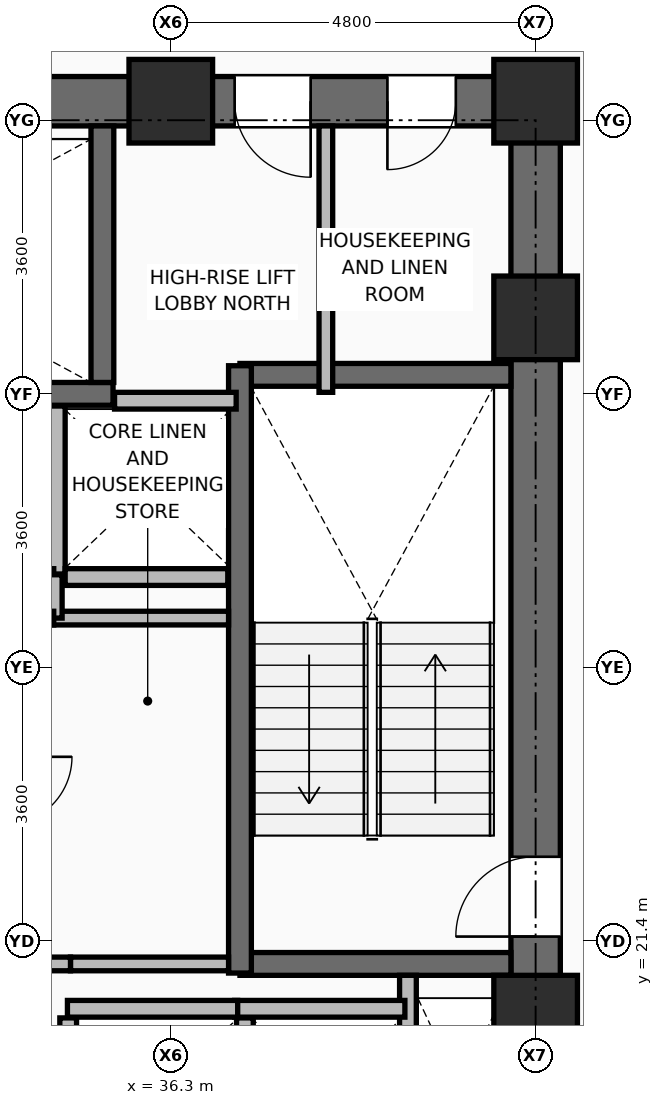
"""IFC4 building model, lengths in metres.
Left out: names, types, materials, properties, quantities, classifications, styles, units other than length and angle.
Written with IfcOpenShell. Run it as: python <this file> out.ifc"""

import sys

from ifc_helpers import new_model, si_unit, direction, frame, frame_2d, origin, origin_2d, place, context, subcontext, project, spatial, rectangle, extrude, element, fill, save


model = new_model("IFC4")
c1 = context("Model", 3, precision=1e-05, world=origin(), true_north=direction((0.0, 1.0)))
c2 = subcontext(c1, "Body", "Model", "MODEL_VIEW")
j1 = project(units=[si_unit("LENGTHUNIT", "METRE"), si_unit("PLANEANGLEUNIT", "RADIAN")], contexts=[c1])
p1 = place(None, origin())
s1 = spatial("IfcSite", under=j1, at=p1, CompositionType="ELEMENT")
p2 = place(p1, origin())
s2 = spatial("IfcBuilding", under=s1, at=p2, CompositionType="ELEMENT")
p3 = place(p2, frame((0.0, 0.0, 60.75)))
s3 = spatial("IfcBuildingStorey", under=s2, at=p3, CompositionType="ELEMENT", Elevation=60.75)
for number, where, z_axis, x_axis in (
    (1, (41.1, 20.4, 0.0), (0.0, 0.0, 1.0), (1.0, 0.0, 0.0)),
    (2, (41.1, 29.6, 0.0), (0.0, 0.0, 1.0), (1.0, 0.0, 0.0)),
    (3, (36.3, 32.45, 0.0), (0.0, 0.0, 1.0), (1.0, 0.0, 0.0)),
    (4, (41.1, 32.45, 0.0), (0.0, 0.0, 1.0), (1.0, 0.0, 0.0)),
):
    element("IfcColumn", number, at=place(p3, frame(where, z_axis=z_axis, x_axis=x_axis)), inside=s3, PredefinedType="COLUMN", context=c2, shape_type="SweptSolid", body=[
        extrude(rectangle(XDim=1.1, YDim=1.1, at=origin_2d()), origin(), (0.0, 0.0, 1.0), 3.75),
    ])
p4 = place(p3, frame((34.95, 17.92, 0.0), z_axis=(0.0, 0.0, 1.0), x_axis=(0.0, 1.0, 0.0)))
e5 = element("IfcWall", 5, at=p4, inside=s3, PredefinedType="PARTITIONING", context=c2, shape_type="SweptSolid", body=[
    extrude(rectangle(XDim=2.47, YDim=0.22, at=frame_2d((1.235, 0.0))), origin(), (0.0, 0.0, 1.0), 2.928),
])
p5 = place(p3, frame((37.275, 18.08, 0.0), z_axis=(0.0, 0.0, 1.0), x_axis=(0.0, 1.0, 0.0)))
e6 = element("IfcWall", 6, at=p5, inside=s3, PredefinedType="PARTITIONING", context=c2, shape_type="SweptSolid", body=[
    extrude(rectangle(XDim=2.31, YDim=0.22, at=frame_2d((1.155, 0.0))), origin(), (0.0, 0.0, 1.0), 3.545),
])
p6 = place(p3, frame((34.8, 26.23, 0.0), z_axis=(0.0, 0.0, 1.0), x_axis=(0.0, 1.0, 0.0)))
e7 = element("IfcWall", 7, at=p6, inside=s3, PredefinedType="PARTITIONING", context=c2, shape_type="SweptSolid", body=[
    extrude(rectangle(XDim=2.21, YDim=0.22, at=frame_2d((1.105, 0.0))), origin(), (0.0, 0.0, 1.0), 3.545),
])
p7 = place(p3, frame((34.91, 26.19, 0.0), z_axis=(0.0, 0.0, 1.0), x_axis=(1.0, 0.0, 0.0)))
e8 = element("IfcWall", 8, at=p7, inside=s3, PredefinedType="PARTITIONING", context=c2, shape_type="SweptSolid", body=[
    extrude(rectangle(XDim=2.14, YDim=0.22, at=frame_2d((1.07, 0.0))), origin(), (0.0, 0.0, 1.0), 3.545),
])
p8 = place(p3, frame((21.575, 32.45, 0.0), z_axis=(0.0, 0.0, 1.0), x_axis=(1.0, 0.0, 0.0)))
e9 = element("IfcWall", 9, at=p8, inside=s3, PredefinedType="SHEAR", context=c2, shape_type="SweptSolid", body=[
    extrude(rectangle(XDim=19.85, YDim=0.65, at=frame_2d((9.925, 0.0))), origin(), (0.0, 0.0, 1.0), 3.57),
])
p9 = place(p8, frame((2.175, 0.0, 0.0)))
e10 = element("IfcOpeningElement", 10, at=p9, cuts=e9, PredefinedType="OPENING", context=c2, shape_type="SweptSolid", body=[
    extrude(rectangle(XDim=1.1, YDim=2.1, at=frame_2d((0.55, 1.05))), frame((0.0, 0.335, 0.0), z_axis=(0.0, -1.0, 0.0), x_axis=(1.0, 0.0, 0.0)), (0.0, 0.0, 1.0), 0.67),
])
p10 = place(p8, frame((15.565, 0.0, 0.0)))
e11 = element("IfcOpeningElement", 11, at=p10, cuts=e9, PredefinedType="OPENING", context=c2, shape_type="SweptSolid", body=[
    extrude(rectangle(XDim=1.0, YDim=2.1, at=frame_2d((0.5, 1.05))), frame((0.0, 0.335, 0.0), z_axis=(0.0, -1.0, 0.0), x_axis=(1.0, 0.0, 0.0)), (0.0, 0.0, 1.0), 0.67),
])
p11 = place(p8, frame((17.575, 0.0, 0.0)))
e12 = element("IfcOpeningElement", 12, at=p11, cuts=e9, PredefinedType="OPENING", context=c2, shape_type="SweptSolid", body=[
    extrude(rectangle(XDim=0.9, YDim=2.1, at=frame_2d((0.45, 1.05))), frame((0.0, 0.335, 0.0), z_axis=(0.0, -1.0, 0.0), x_axis=(1.0, 0.0, 0.0)), (0.0, 0.0, 1.0), 0.67),
])
p12 = place(p3, frame((41.1, 18.125, 0.0), z_axis=(0.0, 0.0, 1.0), x_axis=(0.0, 1.0, 0.0)))
e13 = element("IfcWall", 13, at=p12, inside=s3, PredefinedType="SHEAR", context=c2, shape_type="SweptSolid", body=[
    extrude(rectangle(XDim=14.0, YDim=0.65, at=frame_2d((7.0, 0.0))), origin(), (0.0, 0.0, 1.0), 3.57),
])
p13 = place(p12, frame((3.335, 0.0, 0.0)))
e14 = element("IfcOpeningElement", 14, at=p13, cuts=e13, PredefinedType="OPENING", context=c2, shape_type="SweptSolid", body=[
    extrude(rectangle(XDim=1.05, YDim=2.1, at=frame_2d((0.525, 1.05))), frame((0.0, 0.335, 0.0), z_axis=(0.0, -1.0, 0.0), x_axis=(1.0, 0.0, 0.0)), (0.0, 0.0, 1.0), 0.67),
])
for number, where, z_axis, x_axis in (
    (15, (37.21, 21.1, 0.0), (0.0, 0.0, 1.0), (1.0, 0.0, 0.0)),
    (16, (37.21, 28.85, 0.0), (0.0, 0.0, 1.0), (1.0, 0.0, 0.0)),
):
    element("IfcWall", number, at=place(p3, frame(where, z_axis=z_axis, x_axis=x_axis)), inside=s3, PredefinedType="SHEAR", context=c2, shape_type="SweptSolid", body=[
        extrude(rectangle(XDim=3.565, YDim=0.3, at=frame_2d((1.782, 0.0))), origin(), (0.0, 0.0, 1.0), 3.57),
    ])
p14 = place(p3, frame((37.21, 20.98, 0.0), z_axis=(0.0, 0.0, 1.0), x_axis=(0.0, 1.0, 0.0)))
e17 = element("IfcWall", 17, at=p14, inside=s3, PredefinedType="SHEAR", context=c2, shape_type="SweptSolid", body=[
    extrude(rectangle(XDim=7.99, YDim=0.3, at=frame_2d((3.995, 0.0))), origin(), (0.0, 0.0, 1.0), 3.57),
])
p15 = place(p3, frame((27.51, 28.6, 0.0), z_axis=(0.0, 0.0, 1.0), x_axis=(1.0, 0.0, 0.0)))
e18 = element("IfcWall", 18, at=p15, inside=s3, PredefinedType="SHEAR", context=c2, shape_type="SweptSolid", body=[
    extrude(rectangle(XDim=8.03, YDim=0.3, at=frame_2d((4.015, 0.0))), origin(), (0.0, 0.0, 1.0), 3.57),
])
p16 = place(p3, frame((35.4, 28.75, 0.0), z_axis=(0.0, 0.0, 1.0), x_axis=(0.0, 1.0, 0.0)))
e19 = element("IfcWall", 19, at=p16, inside=s3, PredefinedType="SHEAR", context=c2, shape_type="SweptSolid", body=[
    extrude(rectangle(XDim=3.375, YDim=0.3, at=frame_2d((1.688, 0.0))), origin(), (0.0, 0.0, 1.0), 3.57),
])
p17 = place(p3, frame((39.42, 18.125, 0.0), z_axis=(0.0, 0.0, 1.0), x_axis=(0.0, 1.0, 0.0)))
e20 = element("IfcWall", 20, at=p17, inside=s3, PredefinedType="PARTITIONING", context=c2, shape_type="SweptSolid", body=[
    extrude(rectangle(XDim=2.825, YDim=0.22, at=frame_2d((1.413, 0.0))), origin(), (0.0, 0.0, 1.0), 3.55),
])
for number, where, z_axis, x_axis in (
    (21, (37.14, 20.51, 0.0), (0.0, 0.0, 1.0), (1.0, 0.0, 0.0)),
    (22, (34.94, 20.51, 0.0), (0.0, 0.0, 1.0), (1.0, 0.0, 0.0)),
):
    element("IfcWall", number, at=place(p3, frame(where, z_axis=z_axis, x_axis=x_axis)), inside=s3, PredefinedType="PARTITIONING", context=c2, shape_type="SweptSolid", body=[
        extrude(rectangle(XDim=2.24, YDim=0.22, at=frame_2d((1.12, 0.0))), origin(), (0.0, 0.0, 1.0), 3.55),
    ])
p18 = place(p3, frame((32.44, 26.19, 0.0), z_axis=(0.0, 0.0, 1.0), x_axis=(1.0, 0.0, 0.0)))
e23 = element("IfcWall", 23, at=p18, inside=s3, PredefinedType="PARTITIONING", context=c2, shape_type="SweptSolid", body=[
    extrude(rectangle(XDim=2.32, YDim=0.22, at=frame_2d((1.16, 0.0))), origin(), (0.0, 0.0, 1.0), 3.55),
])
p19 = place(p3, frame((35.56, 28.51, 0.0), z_axis=(0.0, 0.0, 1.0), x_axis=(1.0, 0.0, 0.0)))
e24 = element("IfcWall", 24, at=p19, inside=s3, PredefinedType="PARTITIONING", context=c2, shape_type="SweptSolid", body=[
    extrude(rectangle(XDim=1.6, YDim=0.22, at=frame_2d((0.8, 0.0))), origin(), (0.0, 0.0, 1.0), 3.55),
])
p20 = place(p3, frame((34.98, 21.1, 0.0), z_axis=(0.0, 0.0, 1.0), x_axis=(1.0, 0.0, 0.0)))
e25 = element("IfcWall", 25, at=p20, inside=s3, PredefinedType="PARTITIONING", context=c2, shape_type="SweptSolid", body=[
    extrude(rectangle(XDim=2.08, YDim=0.18, at=frame_2d((1.04, 0.0))), origin(), (0.0, 0.0, 1.0), 3.55),
])
p21 = place(p3, frame((34.72, 25.65, 0.0), z_axis=(0.0, 0.0, 1.0), x_axis=(1.0, 0.0, 0.0)))
e26 = element("IfcWall", 26, at=p21, inside=s3, PredefinedType="PARTITIONING", context=c2, shape_type="SweptSolid", body=[
    extrude(rectangle(XDim=2.34, YDim=0.18, at=frame_2d((1.17, 0.0))), origin(), (0.0, 0.0, 1.0), 3.55),
])
p22 = place(p3, frame((34.76, 25.65, 0.0), z_axis=(0.0, 0.0, 1.0), x_axis=(0.0, 1.0, 0.0)))
e27 = element("IfcWall", 27, at=p22, inside=s3, PredefinedType="PARTITIONING", context=c2, shape_type="SweptSolid", body=[
    extrude(rectangle(XDim=0.57, YDim=0.22, at=frame_2d((0.285, 0.0))), origin(), (0.0, 0.0, 1.0), 3.55),
])
p23 = place(p3, frame((34.1, 21.1, 0.0), z_axis=(0.0, 0.0, 1.0), x_axis=(1.0, 0.0, 0.0)))
e28 = element("IfcWall", 28, at=p23, inside=s3, PredefinedType="PARTITIONING", context=c2, shape_type="SweptSolid", body=[
    extrude(rectangle(XDim=0.88, YDim=0.18, at=frame_2d((0.44, 0.0))), origin(), (0.0, 0.0, 1.0), 3.55),
])
p24 = place(p3, frame((34.1, 25.65, 0.0), z_axis=(0.0, 0.0, 1.0), x_axis=(1.0, 0.0, 0.0)))
e29 = element("IfcWall", 29, at=p24, inside=s3, PredefinedType="PARTITIONING", context=c2, shape_type="SweptSolid", body=[
    extrude(rectangle(XDim=0.66, YDim=0.18, at=frame_2d((0.33, 0.0))), origin(), (0.0, 0.0, 1.0), 3.55),
])
p25 = place(p3, frame((38.34, 28.62, 0.0), z_axis=(0.0, 0.0, 1.0), x_axis=(0.0, 1.0, 0.0)))
e30 = element("IfcWall", 30, at=p25, inside=s3, PredefinedType="PARTITIONING", context=c2, shape_type="SweptSolid", body=[
    extrude(rectangle(XDim=3.505, YDim=0.18, at=frame_2d((1.752, 0.0))), origin(), (0.0, 0.0, 1.0), 3.55),
])
p26 = place(p13, origin())
e31 = element("IfcDoor", 31, at=p26, inside=s3, OperationType="SINGLE_SWING_LEFT", PredefinedType="DOOR", context=c2, shape_type="SweptSolid", body=[
    extrude(rectangle(XDim=1.05, YDim=2.1, at=frame_2d((0.525, 1.05))), frame((0.0, 0.025, 0.0), z_axis=(0.0, -1.0, 0.0), x_axis=(1.0, 0.0, 0.0)), (0.0, 0.0, 1.0), 0.05),
])
fill(e14, e31)
p27 = place(p10, frame((1.0, 0.0, 0.0), z_axis=(0.0, 0.0, 1.0), x_axis=(-1.0, 0.0, 0.0)))
e32 = element("IfcDoor", 32, at=p27, inside=s3, OperationType="SINGLE_SWING_LEFT", PredefinedType="DOOR", context=c2, shape_type="SweptSolid", body=[
    extrude(rectangle(XDim=1.0, YDim=2.1, at=frame_2d((0.5, 1.05))), frame((0.0, 0.025, 0.0), z_axis=(0.0, -1.0, 0.0), x_axis=(1.0, 0.0, 0.0)), (0.0, 0.0, 1.0), 0.05),
])
fill(e11, e32)
p28 = place(p11, frame((0.9, 0.0, 0.0), z_axis=(0.0, 0.0, 1.0), x_axis=(-1.0, 0.0, 0.0)))
e33 = element("IfcDoor", 33, at=p28, inside=s3, OperationType="SINGLE_SWING_RIGHT", PredefinedType="DOOR", context=c2, shape_type="SweptSolid", body=[
    extrude(rectangle(XDim=0.9, YDim=2.1, at=frame_2d((0.45, 1.05))), frame((0.0, 0.025, 0.0), z_axis=(0.0, -1.0, 0.0), x_axis=(1.0, 0.0, 0.0)), (0.0, 0.0, 1.0), 0.05),
])
fill(e12, e33)
save(model, sys.argv[1])
